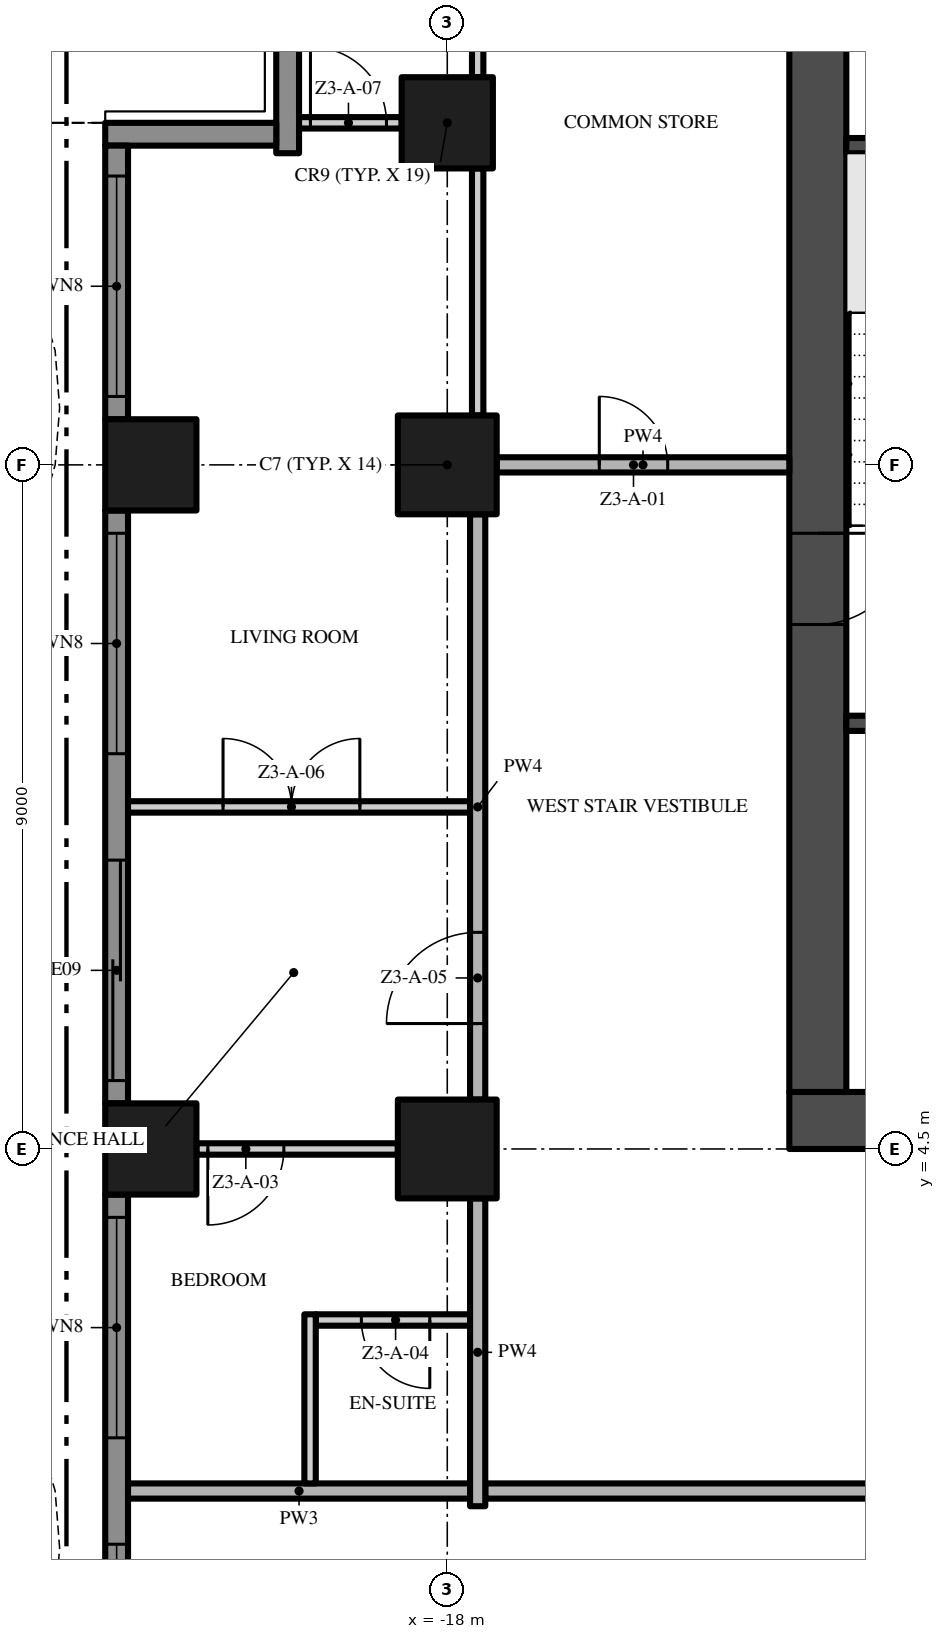
"""IFC4 building model, lengths in metres.
Left out: names, types, materials, properties, quantities, classifications, styles, units other than length and angle.
Written with IfcOpenShell. Run it as: python <this file> out.ifc"""

import sys

from ifc_helpers import new_model, si_unit, direction, frame, frame_2d, origin, origin_2d, place, context, subcontext, project, spatial, polyline, rectangle, outline, extrude, element, fill, save


model = new_model("IFC4")
c1 = context("Model", 3, precision=1e-05, world=origin(), true_north=direction((0.0, 1.0)))
c2 = subcontext(c1, "Body", "Model", "MODEL_VIEW")
j1 = project(units=[si_unit("LENGTHUNIT", "METRE"), si_unit("PLANEANGLEUNIT", "RADIAN")], contexts=[c1])
p1 = place(None, origin())
s1 = spatial("IfcSite", under=j1, at=p1, CompositionType="ELEMENT")
p2 = place(p1, origin())
s2 = spatial("IfcBuilding", under=s1, at=p2, CompositionType="ELEMENT")
p3 = place(p2, frame((0.0, 0.0, 128.8)))
s3 = spatial("IfcBuildingStorey", under=s2, at=p3, CompositionType="ELEMENT", Elevation=128.8)
p4 = place(p3, frame((-13.5, 4.875, -0.3), z_axis=(0.0, 0.0, 1.0), x_axis=(1.0, 0.0, 0.0)))
e1 = element("IfcWall", 1, at=p4, inside=s3, PredefinedType="SHEAR", context=c2, shape_type="SweptSolid", body=[
    extrude(rectangle(XDim=27.0, YDim=0.75, at=frame_2d((13.5, 0.0))), origin(), (0.0, 0.0, 1.0), 3.8),
])
p5 = place(p4, frame((12.0, 0.0, 0.3)))
e2 = element("IfcOpeningElement", 2, at=p5, cuts=e1, PredefinedType="OPENING", context=c2, shape_type="SweptSolid", body=[
    extrude(rectangle(XDim=3.0, YDim=2.4, at=frame_2d((1.5, 1.2))), frame((0.0, 0.385, 0.0), z_axis=(0.0, -1.0, 0.0), x_axis=(1.0, 0.0, 0.0)), (0.0, 0.0, 1.0), 0.77),
])
p6 = place(p4, frame((4.9, 0.0, 0.3)))
e3 = element("IfcOpeningElement", 3, at=p6, cuts=e1, PredefinedType="OPENING", context=c2, shape_type="SweptSolid", body=[
    extrude(rectangle(XDim=1.2, YDim=2.2, at=frame_2d((0.6, 1.1))), frame((0.0, 0.385, 0.0), z_axis=(0.0, -1.0, 0.0), x_axis=(1.0, 0.0, 0.0)), (0.0, 0.0, 1.0), 0.77),
])
p7 = place(p4, frame((20.75, 0.0, 0.3)))
e4 = element("IfcOpeningElement", 4, at=p7, cuts=e1, PredefinedType="OPENING", context=c2, shape_type="SweptSolid", body=[
    extrude(rectangle(XDim=1.5, YDim=2.2, at=frame_2d((0.75, 1.1))), frame((0.0, 0.385, 0.0), z_axis=(0.0, -1.0, 0.0), x_axis=(1.0, 0.0, 0.0)), (0.0, 0.0, 1.0), 0.77),
])
p8 = place(p4, frame((17.4, 0.0, 0.3)))
e5 = element("IfcOpeningElement", 5, at=p8, cuts=e1, PredefinedType="OPENING", context=c2, shape_type="SweptSolid", body=[
    extrude(rectangle(XDim=1.2, YDim=2.2, at=frame_2d((0.6, 1.1))), frame((0.0, 0.385, 0.0), z_axis=(0.0, -1.0, 0.0), x_axis=(1.0, 0.0, 0.0)), (0.0, 0.0, 1.0), 0.77),
])
p9 = place(p3, frame((-13.125, 21.75, -0.3), z_axis=(0.0, 0.0, 1.0), x_axis=(0.0, -1.0, 0.0)))
e6 = element("IfcWall", 6, at=p9, inside=s3, PredefinedType="SHEAR", context=c2, shape_type="SweptSolid", body=[
    extrude(rectangle(XDim=16.5, YDim=0.75, at=frame_2d((8.25, 0.0))), origin(), (0.0, 0.0, 1.0), 3.8),
])
p10 = place(p9, frame((9.15, 0.0, 0.3)))
e7 = element("IfcOpeningElement", 7, at=p10, cuts=e6, PredefinedType="OPENING", context=c2, shape_type="SweptSolid", body=[
    extrude(rectangle(XDim=1.2, YDim=2.2, at=frame_2d((0.6, 1.1))), frame((0.0, 0.385, 0.0), z_axis=(0.0, -1.0, 0.0), x_axis=(1.0, 0.0, 0.0)), (0.0, 0.0, 1.0), 0.77),
])
for number, where, z_axis, x_axis in (
    (8, (-18.0, 13.5, 0.0), (0.0, 0.0, 1.0), (1.0, 0.0, 0.0)),
    (9, (-18.0, 4.5, 0.0), (0.0, 0.0, 1.0), (1.0, 0.0, 0.0)),
):
    element("IfcColumn", number, at=place(p3, frame(where, z_axis=z_axis, x_axis=x_axis)), inside=s3, PredefinedType="COLUMN", context=c2, shape_type="SweptSolid", body=[
        extrude(rectangle(XDim=1.3, YDim=1.3, at=origin_2d()), origin(), (0.0, 0.0, 1.0), 3.5),
    ])
for number, where, z_axis, x_axis in (
    (10, (-21.9, 13.5, 0.0), (0.0, 0.0, 1.0), (1.0, 0.0, 0.0)),
    (11, (-18.0, 18.0, 0.0), (0.0, 0.0, 1.0), (1.0, 0.0, 0.0)),
    (12, (-21.9, 4.5, 0.0), (0.0, 0.0, 1.0), (1.0, 0.0, 0.0)),
):
    element("IfcColumn", number, at=place(p3, frame(where, z_axis=z_axis, x_axis=x_axis)), inside=s3, PredefinedType="COLUMN", context=c2, shape_type="SweptSolid", body=[
        extrude(rectangle(XDim=1.2, YDim=1.2, at=origin_2d()), origin(), (0.0, 0.0, 1.0), 3.5),
    ])
p11 = place(p3, frame((-20.1, 17.6, 0.0), z_axis=(0.0, 0.0, 1.0), x_axis=(0.0, 1.0, 0.0)))
e13 = element("IfcWall", 13, at=p11, inside=s3, PredefinedType="SOLIDWALL", context=c2, shape_type="SweptSolid", body=[
    extrude(rectangle(XDim=2.35, YDim=0.3, at=frame_2d((1.175, 0.0))), origin(), (0.0, 0.0, 1.0), 3.5),
])
p12 = place(p3, frame((-22.5, 17.85, 0.0), z_axis=(0.0, 0.0, 1.0), x_axis=(1.0, 0.0, 0.0)))
e14 = element("IfcWall", 14, at=p12, inside=s3, PredefinedType="SOLIDWALL", context=c2, shape_type="SweptSolid", body=[
    extrude(rectangle(XDim=2.25, YDim=0.3, at=frame_2d((1.125, 0.0))), origin(), (0.0, 0.0, 1.0), 3.5),
])
p13 = place(p3, frame((-22.35, 14.1, 0.0), z_axis=(0.0, 0.0, 1.0), x_axis=(0.0, 1.0, 0.0)))
e15 = element("IfcWall", 15, at=p13, inside=s3, PredefinedType="SOLIDWALL", context=c2, shape_type="SweptSolid", body=[
    extrude(rectangle(XDim=3.6, YDim=0.3, at=frame_2d((1.8, 0.0))), origin(), (0.0, 0.0, 1.0), 3.5),
])
p14 = place(p13, frame((0.3, 0.0, 0.45)))
e16 = element("IfcOpeningElement", 16, at=p14, cuts=e15, PredefinedType="OPENING", context=c2, shape_type="SweptSolid", body=[
    extrude(rectangle(XDim=2.9, YDim=2.65, at=frame_2d((1.45, 1.325))), frame((0.0, 0.16, 0.0), z_axis=(0.0, -1.0, 0.0), x_axis=(1.0, 0.0, 0.0)), (0.0, 0.0, 1.0), 0.32),
])
p15 = place(p3, frame((-22.35, 5.1, 0.0), z_axis=(0.0, 0.0, 1.0), x_axis=(0.0, 1.0, 0.0)))
e17 = element("IfcWall", 17, at=p15, inside=s3, PredefinedType="SOLIDWALL", context=c2, shape_type="SweptSolid", body=[
    extrude(rectangle(XDim=7.8, YDim=0.3, at=frame_2d((3.9, 0.0))), origin(), (0.0, 0.0, 1.0), 3.5),
])
p16 = place(p15, frame((4.6, 0.0, 0.45)))
e18 = element("IfcOpeningElement", 18, at=p16, cuts=e17, PredefinedType="OPENING", context=c2, shape_type="SweptSolid", body=[
    extrude(rectangle(XDim=2.9, YDim=2.65, at=frame_2d((1.45, 1.325))), frame((0.0, 0.16, 0.0), z_axis=(0.0, -1.0, 0.0), x_axis=(1.0, 0.0, 0.0)), (0.0, 0.0, 1.0), 0.32),
])
p17 = place(p15, frame((0.3, 0.0, 0.0)))
e19 = element("IfcOpeningElement", 19, at=p17, cuts=e17, PredefinedType="OPENING", context=c2, shape_type="SweptSolid", body=[
    extrude(rectangle(XDim=2.9, YDim=2.4, at=frame_2d((1.45, 1.2))), frame((0.0, 0.16, 0.0), z_axis=(0.0, -1.0, 0.0), x_axis=(1.0, 0.0, 0.0)), (0.0, 0.0, 1.0), 0.32),
])
p18 = place(p3, frame((-22.35, -3.9, 0.0), z_axis=(0.0, 0.0, 1.0), x_axis=(0.0, 1.0, 0.0)))
e20 = element("IfcWall", 20, at=p18, inside=s3, PredefinedType="SOLIDWALL", context=c2, shape_type="SweptSolid", body=[
    extrude(rectangle(XDim=7.8, YDim=0.3, at=frame_2d((3.9, 0.0))), origin(), (0.0, 0.0, 1.0), 3.5),
])
p19 = place(p18, frame((4.6, 0.0, 0.45)))
e21 = element("IfcOpeningElement", 21, at=p19, cuts=e20, PredefinedType="OPENING", context=c2, shape_type="SweptSolid", body=[
    extrude(rectangle(XDim=2.9, YDim=2.65, at=frame_2d((1.45, 1.325))), frame((0.0, 0.16, 0.0), z_axis=(0.0, -1.0, 0.0), x_axis=(1.0, 0.0, 0.0)), (0.0, 0.0, 1.0), 0.32),
])
p20 = place(p18, frame((0.3, 0.0, 0.45)))
e22 = element("IfcOpeningElement", 22, at=p20, cuts=e20, PredefinedType="OPENING", context=c2, shape_type="SweptSolid", body=[
    extrude(rectangle(XDim=2.9, YDim=2.65, at=frame_2d((1.45, 1.325))), frame((0.0, 0.16, 0.0), z_axis=(0.0, -1.0, 0.0), x_axis=(1.0, 0.0, 0.0)), (0.0, 0.0, 1.0), 0.32),
])
p21 = place(p3, origin())
e23 = element("IfcWall", 23, at=p21, inside=s3, PredefinedType="USERDEFINED", context=c2, shape_type="SweptSolid", body=[
    extrude(outline(polyline([(-24.3, 18.0), (-23.595, 16.5), (-23.159, 15.0), (-23.1, 14.25), (-23.159, 13.5), (-23.595, 12.0), (-24.3, 10.5), (-25.005, 9.0), (-25.441, 7.5), (-25.5, 6.75), (-25.441, 6.0), (-25.005, 4.5), (-24.3, 3.0), (-23.595, 1.5), (-23.159, 0.0), (-23.1, -0.75), (-23.159, -1.5), (-23.595, -3.0), (-24.3, -4.5), (-25.005, -6.0), (-25.441, -7.5), (-25.5, -8.25), (-25.441, -9.0), (-25.005, -10.5), (-24.3, -12.0), (-23.595, -13.5), (-23.368, -13.394), (-24.074, -11.894), (-24.771, -10.411), (-25.194, -8.955), (-25.249, -8.25), (-25.194, -7.545), (-24.771, -6.089), (-24.074, -4.606), (-23.36, -3.089), (-22.911, -1.545), (-22.849, -0.75), (-22.911, 0.045), (-23.36, 1.589), (-24.074, 3.106), (-24.771, 4.589), (-25.194, 6.045), (-25.249, 6.75), (-25.194, 7.455), (-24.771, 8.911), (-24.074, 10.394), (-23.36, 11.911), (-22.911, 13.455), (-22.849, 14.25), (-22.911, 15.045), (-23.36, 16.589), (-24.074, 18.106), (-24.3, 18.0)])), origin(), (0.0, 0.0, 1.0), 0.9),
])
for number, where, z_axis, x_axis in (
    (24, (-12.75, 10.1, 0.0), (0.0, 0.0, 1.0), (1.0, 0.0, 0.0)),
    (25, (-12.75, 17.7, 0.0), (0.0, 0.0, 1.0), (1.0, 0.0, 0.0)),
):
    element("IfcWall", number, at=place(p3, frame(where, z_axis=z_axis, x_axis=x_axis)), inside=s3, PredefinedType="SHEAR", context=c2, shape_type="SweptSolid", body=[
        extrude(rectangle(XDim=3.1, YDim=0.2, at=frame_2d((1.55, 0.0))), origin(), (0.0, 0.0, 1.0), 3.5),
    ])
p22 = place(p3, frame((17.5, 0.0, 0.0), z_axis=(0.0, 0.0, 1.0), x_axis=(-1.0, 0.0, 0.0)))
e26 = element("IfcWall", 26, at=p22, inside=s3, PredefinedType="PARTITIONING", context=c2, shape_type="SweptSolid", body=[
    extrude(rectangle(XDim=35.0, YDim=0.2, at=frame_2d((17.5, 0.0))), origin(), (0.0, 0.0, 1.0), 3.5),
])
p23 = place(p22, frame((16.75, 0.0, 0.0)))
e27 = element("IfcOpeningElement", 27, at=p23, cuts=e26, PredefinedType="OPENING", context=c2, shape_type="SweptSolid", body=[
    extrude(rectangle(XDim=1.5, YDim=2.4, at=frame_2d((0.75, 1.2))), frame((0.0, 0.11, 0.0), z_axis=(0.0, -1.0, 0.0), x_axis=(1.0, 0.0, 0.0)), (0.0, 0.0, 1.0), 0.22),
])
p24 = place(p3, frame((-22.2, 0.0, 0.0), z_axis=(0.0, 0.0, 1.0), x_axis=(1.0, 0.0, 0.0)))
e28 = element("IfcWall", 28, at=p24, inside=s3, PredefinedType="PARTITIONING", context=c2, shape_type="SweptSolid", body=[
    extrude(rectangle(XDim=4.5, YDim=0.2, at=frame_2d((2.25, 0.0))), origin(), (0.0, 0.0, 1.0), 3.5),
])
p25 = place(p3, frame((-17.7, 2.25, 0.0), z_axis=(0.0, 0.0, 1.0), x_axis=(-1.0, 0.0, 0.0)))
e29 = element("IfcWall", 29, at=p25, inside=s3, PredefinedType="PARTITIONING", context=c2, shape_type="SweptSolid", body=[
    extrude(rectangle(XDim=2.03, YDim=0.15, at=frame_2d((1.015, 0.0))), origin(), (0.0, 0.0, 1.0), 3.5),
])
p26 = place(p25, frame((0.53, 0.0, 0.0)))
e30 = element("IfcOpeningElement", 30, at=p26, cuts=e29, PredefinedType="OPENING", context=c2, shape_type="SweptSolid", body=[
    extrude(rectangle(XDim=0.9, YDim=2.1, at=frame_2d((0.45, 1.05))), frame((0.0, 0.085, 0.0), z_axis=(0.0, -1.0, 0.0), x_axis=(1.0, 0.0, 0.0)), (0.0, 0.0, 1.0), 0.17),
])
p27 = place(p3, frame((-18.65, 4.5, 0.0), z_axis=(0.0, 0.0, 1.0), x_axis=(-1.0, 0.0, 0.0)))
e31 = element("IfcWall", 31, at=p27, inside=s3, PredefinedType="PARTITIONING", context=c2, shape_type="SweptSolid", body=[
    extrude(rectangle(XDim=2.65, YDim=0.15, at=frame_2d((1.325, 0.0))), origin(), (0.0, 0.0, 1.0), 3.5),
])
p28 = place(p27, frame((1.5, 0.0, 0.0)))
e32 = element("IfcOpeningElement", 32, at=p28, cuts=e31, PredefinedType="OPENING", context=c2, shape_type="SweptSolid", body=[
    extrude(rectangle(XDim=1.0, YDim=2.4, at=frame_2d((0.5, 1.2))), frame((0.0, 0.085, 0.0), z_axis=(0.0, -1.0, 0.0), x_axis=(1.0, 0.0, 0.0)), (0.0, 0.0, 1.0), 0.17),
])
p29 = place(p3, frame((-22.2, 9.0, 0.0), z_axis=(0.0, 0.0, 1.0), x_axis=(1.0, 0.0, 0.0)))
e33 = element("IfcWall", 33, at=p29, inside=s3, PredefinedType="PARTITIONING", context=c2, shape_type="SweptSolid", body=[
    extrude(rectangle(XDim=4.5, YDim=0.15, at=frame_2d((2.25, 0.0))), origin(), (0.0, 0.0, 1.0), 3.5),
])
p30 = place(p29, frame((1.25, 0.0, 0.0)))
e34 = element("IfcOpeningElement", 34, at=p30, cuts=e33, PredefinedType="OPENING", context=c2, shape_type="SweptSolid", body=[
    extrude(rectangle(XDim=1.8, YDim=2.4, at=frame_2d((0.9, 1.2))), frame((0.0, 0.085, 0.0), z_axis=(0.0, -1.0, 0.0), x_axis=(1.0, 0.0, 0.0)), (0.0, 0.0, 1.0), 0.17),
])
p31 = place(p3, frame((-17.35, 13.5, 0.0), z_axis=(0.0, 0.0, 1.0), x_axis=(1.0, 0.0, 0.0)))
e35 = element("IfcWall", 35, at=p31, inside=s3, PredefinedType="PARTITIONING", context=c2, shape_type="SweptSolid", body=[
    extrude(rectangle(XDim=3.85, YDim=0.2, at=frame_2d((1.925, 0.0))), origin(), (0.0, 0.0, 1.0), 3.5),
])
p32 = place(p31, frame((1.35, 0.0, 0.0)))
e36 = element("IfcOpeningElement", 36, at=p32, cuts=e35, PredefinedType="OPENING", context=c2, shape_type="SweptSolid", body=[
    extrude(rectangle(XDim=0.9, YDim=2.1, at=frame_2d((0.45, 1.05))), frame((0.0, 0.11, 0.0), z_axis=(0.0, -1.0, 0.0), x_axis=(1.0, 0.0, 0.0)), (0.0, 0.0, 1.0), 0.22),
])
p33 = place(p3, frame((-19.95, 18.0, 0.0), z_axis=(0.0, 0.0, 1.0), x_axis=(1.0, 0.0, 0.0)))
e37 = element("IfcWall", 37, at=p33, inside=s3, PredefinedType="PARTITIONING", context=c2, shape_type="SweptSolid", body=[
    extrude(rectangle(XDim=1.35, YDim=0.15, at=frame_2d((0.675, 0.0))), origin(), (0.0, 0.0, 1.0), 3.5),
])
p34 = place(p33, frame((0.15, 0.0, 0.0)))
e38 = element("IfcOpeningElement", 38, at=p34, cuts=e37, PredefinedType="OPENING", context=c2, shape_type="SweptSolid", body=[
    extrude(rectangle(XDim=1.0, YDim=2.4, at=frame_2d((0.5, 1.2))), frame((0.0, 0.085, 0.0), z_axis=(0.0, -1.0, 0.0), x_axis=(1.0, 0.0, 0.0)), (0.0, 0.0, 1.0), 0.17),
])
p35 = place(p3, frame((-19.805, 0.1, 0.0), z_axis=(0.0, 0.0, 1.0), x_axis=(0.0, 1.0, 0.0)))
e39 = element("IfcWall", 39, at=p35, inside=s3, PredefinedType="PARTITIONING", context=c2, shape_type="SweptSolid", body=[
    extrude(rectangle(XDim=2.225, YDim=0.15, at=frame_2d((1.113, 0.0))), origin(), (0.0, 0.0, 1.0), 3.5),
])
p36 = place(p3, frame((-17.6, -0.2, 0.0), z_axis=(0.0, 0.0, 1.0), x_axis=(0.0, 1.0, 0.0)))
e40 = element("IfcWall", 40, at=p36, inside=s3, PredefinedType="PARTITIONING", context=c2, shape_type="SweptSolid", body=[
    extrude(rectangle(XDim=4.05, YDim=0.2, at=frame_2d((2.025, 0.0))), origin(), (0.0, 0.0, 1.0), 3.5),
])
p37 = place(p3, frame((-17.6, 5.15, 0.0), z_axis=(0.0, 0.0, 1.0), x_axis=(0.0, 1.0, 0.0)))
e41 = element("IfcWall", 41, at=p37, inside=s3, PredefinedType="PARTITIONING", context=c2, shape_type="SweptSolid", body=[
    extrude(rectangle(XDim=7.7, YDim=0.2, at=frame_2d((3.85, 0.0))), origin(), (0.0, 0.0, 1.0), 3.5),
])
p38 = place(p37, frame((1.0, 0.0, 0.0)))
e42 = element("IfcOpeningElement", 42, at=p38, cuts=e41, PredefinedType="OPENING", context=c2, shape_type="SweptSolid", body=[
    extrude(rectangle(XDim=1.2, YDim=2.4, at=frame_2d((0.6, 1.2))), frame((0.0, 0.11, 0.0), z_axis=(0.0, -1.0, 0.0), x_axis=(1.0, 0.0, 0.0)), (0.0, 0.0, 1.0), 0.22),
])
p39 = place(p3, frame((-17.6, 14.15, 0.0), z_axis=(0.0, 0.0, 1.0), x_axis=(0.0, 1.0, 0.0)))
e43 = element("IfcWall", 43, at=p39, inside=s3, PredefinedType="PARTITIONING", context=c2, shape_type="SweptSolid", body=[
    extrude(rectangle(XDim=3.25, YDim=0.15, at=frame_2d((1.625, 0.0))), origin(), (0.0, 0.0, 1.0), 3.5),
])
p40 = place(p3, frame((-17.6, 18.6, 0.0), z_axis=(0.0, 0.0, 1.0), x_axis=(0.0, 1.0, 0.0)))
e44 = element("IfcWall", 44, at=p40, inside=s3, PredefinedType="PARTITIONING", context=c2, shape_type="SweptSolid", body=[
    extrude(rectangle(XDim=2.7, YDim=0.15, at=frame_2d((1.35, 0.0))), origin(), (0.0, 0.0, 1.0), 3.5),
])
p41 = place(p14, origin())
e45 = element("IfcWindow", 45, at=p41, inside=s3, PartitioningType="SINGLE_PANEL", PredefinedType="WINDOW", context=c2, shape_type="SweptSolid", body=[
    extrude(rectangle(XDim=2.9, YDim=2.65, at=frame_2d((1.45, 1.325))), frame((0.0, 0.03, 0.0), z_axis=(0.0, -1.0, 0.0), x_axis=(1.0, 0.0, 0.0)), (0.0, 0.0, 1.0), 0.06),
])
fill(e16, e45)
p42 = place(p16, origin())
e46 = element("IfcWindow", 46, at=p42, inside=s3, PartitioningType="SINGLE_PANEL", PredefinedType="WINDOW", context=c2, shape_type="SweptSolid", body=[
    extrude(rectangle(XDim=2.9, YDim=2.65, at=frame_2d((1.45, 1.325))), frame((0.0, 0.03, 0.0), z_axis=(0.0, -1.0, 0.0), x_axis=(1.0, 0.0, 0.0)), (0.0, 0.0, 1.0), 0.06),
])
fill(e18, e46)
p43 = place(p17, origin())
e47 = element("IfcDoor", 47, at=p43, inside=s3, OperationType="SINGLE_SWING_LEFT", PredefinedType="DOOR", context=c2, shape_type="SweptSolid", body=[
    extrude(rectangle(XDim=2.9, YDim=2.4, at=frame_2d((1.45, 1.2))), frame((0.0, 0.025, 0.0), z_axis=(0.0, -1.0, 0.0), x_axis=(1.0, 0.0, 0.0)), (0.0, 0.0, 1.0), 0.05),
])
fill(e19, e47)
p44 = place(p19, origin())
e48 = element("IfcWindow", 48, at=p44, inside=s3, PartitioningType="SINGLE_PANEL", PredefinedType="WINDOW", context=c2, shape_type="SweptSolid", body=[
    extrude(rectangle(XDim=2.9, YDim=2.65, at=frame_2d((1.45, 1.325))), frame((0.0, 0.03, 0.0), z_axis=(0.0, -1.0, 0.0), x_axis=(1.0, 0.0, 0.0)), (0.0, 0.0, 1.0), 0.06),
])
fill(e21, e48)
p45 = place(p20, origin())
e49 = element("IfcWindow", 49, at=p45, inside=s3, PartitioningType="SINGLE_PANEL", PredefinedType="WINDOW", context=c2, shape_type="SweptSolid", body=[
    extrude(rectangle(XDim=2.9, YDim=2.65, at=frame_2d((1.45, 1.325))), frame((0.0, 0.03, 0.0), z_axis=(0.0, -1.0, 0.0), x_axis=(1.0, 0.0, 0.0)), (0.0, 0.0, 1.0), 0.06),
])
fill(e22, e49)
p46 = place(p10, frame((1.2, 0.0, 0.0), z_axis=(0.0, 0.0, 1.0), x_axis=(-1.0, 0.0, 0.0)))
e50 = element("IfcDoor", 50, at=p46, inside=s3, OperationType="SINGLE_SWING_RIGHT", PredefinedType="DOOR", context=c2, shape_type="SweptSolid", body=[
    extrude(rectangle(XDim=1.2, YDim=2.2, at=frame_2d((0.6, 1.1))), frame((0.0, 0.025, 0.0), z_axis=(0.0, -1.0, 0.0), x_axis=(1.0, 0.0, 0.0)), (0.0, 0.0, 1.0), 0.05),
])
fill(e7, e50)
p47 = place(p32, origin())
e51 = element("IfcDoor", 51, at=p47, inside=s3, OperationType="SINGLE_SWING_LEFT", PredefinedType="DOOR", context=c2, shape_type="SweptSolid", body=[
    extrude(rectangle(XDim=0.9, YDim=2.1, at=frame_2d((0.45, 1.05))), frame((0.0, 0.025, 0.0), z_axis=(0.0, -1.0, 0.0), x_axis=(1.0, 0.0, 0.0)), (0.0, 0.0, 1.0), 0.05),
])
fill(e36, e51)
p48 = place(p28, origin())
e52 = element("IfcDoor", 52, at=p48, inside=s3, OperationType="SINGLE_SWING_RIGHT", PredefinedType="DOOR", context=c2, shape_type="SweptSolid", body=[
    extrude(rectangle(XDim=1.0, YDim=2.4, at=frame_2d((0.5, 1.2))), frame((0.0, 0.025, 0.0), z_axis=(0.0, -1.0, 0.0), x_axis=(1.0, 0.0, 0.0)), (0.0, 0.0, 1.0), 0.05),
])
fill(e32, e52)
p49 = place(p26, origin())
e53 = element("IfcDoor", 53, at=p49, inside=s3, OperationType="SINGLE_SWING_LEFT", PredefinedType="DOOR", context=c2, shape_type="SweptSolid", body=[
    extrude(rectangle(XDim=0.9, YDim=2.1, at=frame_2d((0.45, 1.05))), frame((0.0, 0.025, 0.0), z_axis=(0.0, -1.0, 0.0), x_axis=(1.0, 0.0, 0.0)), (0.0, 0.0, 1.0), 0.05),
])
fill(e30, e53)
p50 = place(p38, origin())
e54 = element("IfcDoor", 54, at=p50, inside=s3, OperationType="SINGLE_SWING_LEFT", PredefinedType="DOOR", context=c2, shape_type="SweptSolid", body=[
    extrude(rectangle(XDim=1.2, YDim=2.4, at=frame_2d((0.6, 1.2))), frame((0.0, 0.025, 0.0), z_axis=(0.0, -1.0, 0.0), x_axis=(1.0, 0.0, 0.0)), (0.0, 0.0, 1.0), 0.05),
])
fill(e42, e54)
p51 = place(p30, origin())
e55 = element("IfcDoor", 55, at=p51, inside=s3, OperationType="DOUBLE_DOOR_SINGLE_SWING", PredefinedType="DOOR", context=c2, shape_type="SweptSolid", body=[
    extrude(rectangle(XDim=1.8, YDim=2.4, at=frame_2d((0.9, 1.2))), frame((0.0, 0.025, 0.0), z_axis=(0.0, -1.0, 0.0), x_axis=(1.0, 0.0, 0.0)), (0.0, 0.0, 1.0), 0.05),
])
fill(e34, e55)
p52 = place(p34, origin())
e56 = element("IfcDoor", 56, at=p52, inside=s3, OperationType="SINGLE_SWING_LEFT", PredefinedType="DOOR", context=c2, shape_type="SweptSolid", body=[
    extrude(rectangle(XDim=1.0, YDim=2.4, at=frame_2d((0.5, 1.2))), frame((0.0, 0.025, 0.0), z_axis=(0.0, -1.0, 0.0), x_axis=(1.0, 0.0, 0.0)), (0.0, 0.0, 1.0), 0.05),
])
fill(e38, e56)
save(model, sys.argv[1])
